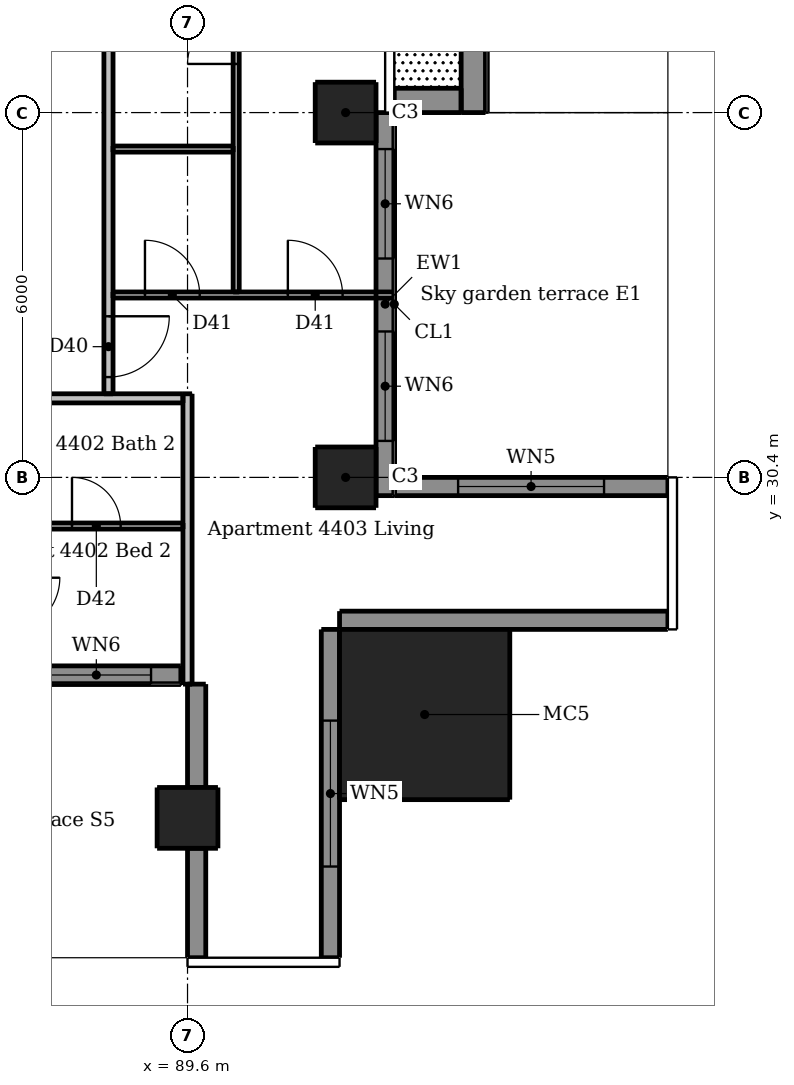
"""IFC4 building model, lengths in metres.
Left out: names, types, materials, properties, quantities, classifications, styles, units other than length and angle.
Written with IfcOpenShell. Run it as: python <this file> out.ifc"""

import sys

from ifc_helpers import new_model, si_unit, direction, frame, frame_2d, origin, origin_2d, place, context, subcontext, project, spatial, rectangle, extrude, element, fill, save


model = new_model("IFC4")
c1 = context("Model", 3, precision=1e-05, world=origin(), true_north=direction((0.0, 1.0)))
c2 = subcontext(c1, "Body", "Model", "MODEL_VIEW")
j1 = project(units=[si_unit("LENGTHUNIT", "METRE"), si_unit("PLANEANGLEUNIT", "RADIAN")], contexts=[c1])
p1 = place(None, origin())
s1 = spatial("IfcSite", under=j1, at=p1, CompositionType="ELEMENT")
p2 = place(p1, origin())
s2 = spatial("IfcBuilding", under=s1, at=p2, CompositionType="ELEMENT")
p3 = place(p2, frame((0.0, 0.0, 164.8)))
s3 = spatial("IfcBuildingStorey", under=s2, at=p3, CompositionType="ELEMENT", Elevation=164.8)
for number, where, z_axis, x_axis in (
    (1, (89.6, 24.8, 0.0), (0.0, 0.0, 1.0), (1.0, 0.0, 0.0)),
    (2, (92.2, 30.4, 0.0), (0.0, 0.0, 1.0), (1.0, 0.0, 0.0)),
    (3, (92.2, 36.4, 0.0), (0.0, 0.0, 1.0), (1.0, 0.0, 0.0)),
):
    element("IfcColumn", number, at=place(p3, frame(where, z_axis=z_axis, x_axis=x_axis)), inside=s3, PredefinedType="COLUMN", context=c2, shape_type="SweptSolid", body=[
        extrude(rectangle(XDim=1.0, YDim=1.0, at=origin_2d()), origin(), (0.0, 0.0, 1.0), 3.05),
    ])
p4 = place(p3, frame((93.5, 26.5, 0.0), z_axis=(0.0, 0.0, 1.0), x_axis=(1.0, 0.0, 0.0)))
e4 = element("IfcColumn", 4, at=p4, inside=s3, PredefinedType="COLUMN", context=c2, shape_type="SweptSolid", body=[
    extrude(rectangle(XDim=2.8, YDim=2.8, at=origin_2d()), origin(), (0.0, 0.0, 1.0), 3.3),
])
p5 = place(p3, frame((89.75, 27.0, 0.0), z_axis=(0.0, 0.0, 1.0), x_axis=(0.0, -1.0, 0.0)))
e5 = element("IfcWall", 5, at=p5, inside=s3, PredefinedType="SOLIDWALL", context=c2, shape_type="SweptSolid", body=[
    extrude(rectangle(XDim=1.7, YDim=0.3, at=frame_2d((0.85, 0.0))), origin(), (0.0, 0.0, 1.0), 3.05),
])
p6 = place(p3, frame((89.75, 24.3, 0.0), z_axis=(0.0, 0.0, 1.0), x_axis=(0.0, -1.0, 0.0)))
e6 = element("IfcWall", 6, at=p6, inside=s3, PredefinedType="SOLIDWALL", context=c2, shape_type="SweptSolid", body=[
    extrude(rectangle(XDim=1.8, YDim=0.3, at=frame_2d((0.9, 0.0))), origin(), (0.0, 0.0, 1.0), 3.05),
])
p7 = place(p3, frame((91.95, 22.5, 0.0), z_axis=(0.0, 0.0, 1.0), x_axis=(0.0, 1.0, 0.0)))
e7 = element("IfcWall", 7, at=p7, inside=s3, PredefinedType="SOLIDWALL", context=c2, shape_type="SweptSolid", body=[
    extrude(rectangle(XDim=5.4, YDim=0.3, at=frame_2d((2.7, 0.0))), origin(), (0.0, 0.0, 1.0), 3.05),
])
p8 = place(p7, frame((1.5, 0.0, 0.15)))
e8 = element("IfcOpeningElement", 8, at=p8, cuts=e7, PredefinedType="OPENING", context=c2, shape_type="SweptSolid", body=[
    extrude(rectangle(XDim=2.4, YDim=2.1, at=frame_2d((1.2, 1.05))), frame((0.0, 0.16, 0.0), z_axis=(0.0, -1.0, 0.0), x_axis=(1.0, 0.0, 0.0)), (0.0, 0.0, 1.0), 0.32),
])
p9 = place(p3, frame((92.1, 28.05, 0.0), z_axis=(0.0, 0.0, 1.0), x_axis=(1.0, 0.0, 0.0)))
e9 = element("IfcWall", 9, at=p9, inside=s3, PredefinedType="SOLIDWALL", context=c2, shape_type="SweptSolid", body=[
    extrude(rectangle(XDim=5.4, YDim=0.3, at=frame_2d((2.7, 0.0))), origin(), (0.0, 0.0, 1.0), 3.05),
])
p10 = place(p3, frame((97.5, 30.25, 0.0), z_axis=(0.0, 0.0, 1.0), x_axis=(-1.0, 0.0, 0.0)))
e10 = element("IfcWall", 10, at=p10, inside=s3, PredefinedType="SOLIDWALL", context=c2, shape_type="SweptSolid", body=[
    extrude(rectangle(XDim=4.5, YDim=0.3, at=frame_2d((2.25, 0.0))), origin(), (0.0, 0.0, 1.0), 3.05),
])
p11 = place(p10, frame((1.05, 0.0, 0.15)))
e11 = element("IfcOpeningElement", 11, at=p11, cuts=e10, PredefinedType="OPENING", context=c2, shape_type="SweptSolid", body=[
    extrude(rectangle(XDim=2.4, YDim=2.1, at=frame_2d((1.2, 1.05))), frame((0.0, 0.16, 0.0), z_axis=(0.0, -1.0, 0.0), x_axis=(1.0, 0.0, 0.0)), (0.0, 0.0, 1.0), 0.32),
])
p12 = place(p3, frame((83.6, 27.15, 0.0), z_axis=(0.0, 0.0, 1.0), x_axis=(1.0, 0.0, 0.0)))
e12 = element("IfcWall", 12, at=p12, inside=s3, PredefinedType="SOLIDWALL", context=c2, shape_type="SweptSolid", body=[
    extrude(rectangle(XDim=5.89, YDim=0.3, at=frame_2d((2.945, 0.0))), origin(), (0.0, 0.0, 1.0), 3.05),
])
p13 = place(p12, frame((0.6, 0.0, 0.15)))
e13 = element("IfcOpeningElement", 13, at=p13, cuts=e12, PredefinedType="OPENING", context=c2, shape_type="SweptSolid", body=[
    extrude(rectangle(XDim=1.8, YDim=2.1, at=frame_2d((0.9, 1.05))), frame((0.0, 0.16, 0.0), z_axis=(0.0, -1.0, 0.0), x_axis=(1.0, 0.0, 0.0)), (0.0, 0.0, 1.0), 0.32),
])
p14 = place(p12, frame((3.6, 0.0, 0.15)))
e14 = element("IfcOpeningElement", 14, at=p14, cuts=e12, PredefinedType="OPENING", context=c2, shape_type="SweptSolid", body=[
    extrude(rectangle(XDim=1.8, YDim=2.1, at=frame_2d((0.9, 1.05))), frame((0.0, 0.16, 0.0), z_axis=(0.0, -1.0, 0.0), x_axis=(1.0, 0.0, 0.0)), (0.0, 0.0, 1.0), 0.32),
])
p15 = place(p3, frame((92.85, 30.1, 0.0), z_axis=(0.0, 0.0, 1.0), x_axis=(0.0, 1.0, 0.0)))
e15 = element("IfcWall", 15, at=p15, inside=s3, PredefinedType="SOLIDWALL", context=c2, shape_type="SweptSolid", body=[
    extrude(rectangle(XDim=6.3, YDim=0.3, at=frame_2d((3.15, 0.0))), origin(), (0.0, 0.0, 1.0), 3.05),
])
p16 = place(p15, frame((0.9, 0.0, 0.15)))
e16 = element("IfcOpeningElement", 16, at=p16, cuts=e15, PredefinedType="OPENING", context=c2, shape_type="SweptSolid", body=[
    extrude(rectangle(XDim=1.8, YDim=2.1, at=frame_2d((0.9, 1.05))), frame((0.0, 0.16, 0.0), z_axis=(0.0, -1.0, 0.0), x_axis=(1.0, 0.0, 0.0)), (0.0, 0.0, 1.0), 0.32),
])
p17 = place(p15, frame((3.9, 0.0, 0.15)))
e17 = element("IfcOpeningElement", 17, at=p17, cuts=e15, PredefinedType="OPENING", context=c2, shape_type="SweptSolid", body=[
    extrude(rectangle(XDim=1.8, YDim=2.1, at=frame_2d((0.9, 1.05))), frame((0.0, 0.16, 0.0), z_axis=(0.0, -1.0, 0.0), x_axis=(1.0, 0.0, 0.0)), (0.0, 0.0, 1.0), 0.32),
])
p18 = place(p3, frame((94.3, 36.4, 0.03), z_axis=(0.0, 0.0, 1.0), x_axis=(0.0, 1.0, 0.0)))
e18 = element("IfcWall", 18, at=p18, inside=s3, PredefinedType="PARAPET", context=c2, shape_type="SweptSolid", body=[
    extrude(rectangle(XDim=6.0, YDim=0.4, at=frame_2d((3.0, 0.0))), origin(), (0.0, 0.0, 1.0), 1.1),
])
p19 = place(p3, frame((93.0, 36.6, 0.03), z_axis=(0.0, 0.0, 1.0), x_axis=(1.0, 0.0, 0.0)))
e19 = element("IfcWall", 19, at=p19, inside=s3, PredefinedType="PARAPET", context=c2, shape_type="SweptSolid", body=[
    extrude(rectangle(XDim=1.1, YDim=0.4, at=frame_2d((0.55, 0.0))), origin(), (0.0, 0.0, 1.0), 1.1),
])
p20 = place(p3, frame((90.4, 33.45, 0.0), z_axis=(0.0, 0.0, 1.0), x_axis=(0.0, 1.0, 0.0)))
e20 = element("IfcWall", 20, at=p20, inside=s3, PredefinedType="PARTITIONING", context=c2, shape_type="SweptSolid", body=[
    extrude(rectangle(XDim=9.0, YDim=0.1, at=frame_2d((4.5, 0.0))), origin(), (0.0, 0.0, 1.0), 3.05),
])
p21 = place(p20, frame((3.75, 0.0, 0.0)))
e21 = element("IfcOpeningElement", 21, at=p21, cuts=e20, PredefinedType="OPENING", context=c2, shape_type="SweptSolid", body=[
    extrude(rectangle(XDim=0.8, YDim=2.1, at=frame_2d((0.4, 1.05))), frame((0.0, 0.06, 0.0), z_axis=(0.0, -1.0, 0.0), x_axis=(1.0, 0.0, 0.0)), (0.0, 0.0, 1.0), 0.12),
])
p22 = place(p20, frame((7.0, 0.0, 0.0)))
e22 = element("IfcOpeningElement", 22, at=p22, cuts=e20, PredefinedType="OPENING", context=c2, shape_type="SweptSolid", body=[
    extrude(rectangle(XDim=0.9, YDim=2.1, at=frame_2d((0.45, 1.05))), frame((0.0, 0.06, 0.0), z_axis=(0.0, -1.0, 0.0), x_axis=(1.0, 0.0, 0.0)), (0.0, 0.0, 1.0), 0.12),
])
p23 = place(p3, frame((88.375, 35.8, 0.0), z_axis=(0.0, 0.0, 1.0), x_axis=(1.0, 0.0, 0.0)))
e23 = element("IfcWall", 23, at=p23, inside=s3, PredefinedType="PARTITIONING", context=c2, shape_type="SweptSolid", body=[
    extrude(rectangle(XDim=1.975, YDim=0.1, at=frame_2d((0.988, 0.0))), origin(), (0.0, 0.0, 1.0), 3.05),
])
p24 = place(p3, frame((88.375, 33.4, 0.0), z_axis=(0.0, 0.0, 1.0), x_axis=(1.0, 0.0, 0.0)))
e24 = element("IfcWall", 24, at=p24, inside=s3, PredefinedType="PARTITIONING", context=c2, shape_type="SweptSolid", body=[
    extrude(rectangle(XDim=4.625, YDim=0.1, at=frame_2d((2.312, 0.0))), origin(), (0.0, 0.0, 1.0), 3.05),
])
p25 = place(p24, frame((0.525, 0.0, 0.0)))
e25 = element("IfcOpeningElement", 25, at=p25, cuts=e24, PredefinedType="OPENING", context=c2, shape_type="SweptSolid", body=[
    extrude(rectangle(XDim=0.9, YDim=2.1, at=frame_2d((0.45, 1.05))), frame((0.0, 0.06, 0.0), z_axis=(0.0, -1.0, 0.0), x_axis=(1.0, 0.0, 0.0)), (0.0, 0.0, 1.0), 0.12),
])
p26 = place(p24, frame((2.875, 0.0, 0.0)))
e26 = element("IfcOpeningElement", 26, at=p26, cuts=e24, PredefinedType="OPENING", context=c2, shape_type="SweptSolid", body=[
    extrude(rectangle(XDim=0.9, YDim=2.1, at=frame_2d((0.45, 1.05))), frame((0.0, 0.06, 0.0), z_axis=(0.0, -1.0, 0.0), x_axis=(1.0, 0.0, 0.0)), (0.0, 0.0, 1.0), 0.12),
])
p27 = place(p3, frame((83.65, 29.6, 0.0), z_axis=(0.0, 0.0, 1.0), x_axis=(1.0, 0.0, 0.0)))
e27 = element("IfcWall", 27, at=p27, inside=s3, PredefinedType="PARTITIONING", context=c2, shape_type="SweptSolid", body=[
    extrude(rectangle(XDim=5.875, YDim=0.1, at=frame_2d((2.938, 0.0))), origin(), (0.0, 0.0, 1.0), 3.05),
])
p28 = place(p27, frame((1.0, 0.0, 0.0)))
e28 = element("IfcOpeningElement", 28, at=p28, cuts=e27, PredefinedType="OPENING", context=c2, shape_type="SweptSolid", body=[
    extrude(rectangle(XDim=0.9, YDim=2.1, at=frame_2d((0.45, 1.05))), frame((0.0, 0.06, 0.0), z_axis=(0.0, -1.0, 0.0), x_axis=(1.0, 0.0, 0.0)), (0.0, 0.0, 1.0), 0.12),
])
p29 = place(p27, frame((4.05, 0.0, 0.0)))
e29 = element("IfcOpeningElement", 29, at=p29, cuts=e27, PredefinedType="OPENING", context=c2, shape_type="SweptSolid", body=[
    extrude(rectangle(XDim=0.8, YDim=2.1, at=frame_2d((0.4, 1.05))), frame((0.0, 0.06, 0.0), z_axis=(0.0, -1.0, 0.0), x_axis=(1.0, 0.0, 0.0)), (0.0, 0.0, 1.0), 0.12),
])
p30 = place(p3, frame((88.3, 61.175, 0.0), z_axis=(0.0, 0.0, 1.0), x_axis=(0.0, -1.0, 0.0)))
e30 = element("IfcWall", 30, at=p30, inside=s3, PredefinedType="PARTITIONING", context=c2, shape_type="SweptSolid", body=[
    extrude(rectangle(XDim=29.4, YDim=0.15, at=frame_2d((14.7, 0.0))), origin(), (0.0, 0.0, 1.0), 3.05),
])
p31 = place(p30, frame((28.125, 0.0, 0.0)))
e31 = element("IfcOpeningElement", 31, at=p31, cuts=e30, PredefinedType="OPENING", context=c2, shape_type="SweptSolid", body=[
    extrude(rectangle(XDim=1.0, YDim=2.1, at=frame_2d((0.5, 1.05))), frame((0.0, 0.085, 0.0), z_axis=(0.0, -1.0, 0.0), x_axis=(1.0, 0.0, 0.0)), (0.0, 0.0, 1.0), 0.17),
])
p32 = place(p30, frame((13.775, 0.0, 0.0)))
e32 = element("IfcOpeningElement", 32, at=p32, cuts=e30, PredefinedType="OPENING", context=c2, shape_type="SweptSolid", body=[
    extrude(rectangle(XDim=1.0, YDim=2.1, at=frame_2d((0.5, 1.05))), frame((0.0, 0.085, 0.0), z_axis=(0.0, -1.0, 0.0), x_axis=(1.0, 0.0, 0.0)), (0.0, 0.0, 1.0), 0.17),
])
p33 = place(p30, frame((3.275, 0.0, 0.0)))
e33 = element("IfcOpeningElement", 33, at=p33, cuts=e30, PredefinedType="OPENING", context=c2, shape_type="SweptSolid", body=[
    extrude(rectangle(XDim=1.0, YDim=2.1, at=frame_2d((0.5, 1.05))), frame((0.0, 0.085, 0.0), z_axis=(0.0, -1.0, 0.0), x_axis=(1.0, 0.0, 0.0)), (0.0, 0.0, 1.0), 0.17),
])
p34 = place(p3, frame((89.6, 27.0, 0.0), z_axis=(0.0, 0.0, 1.0), x_axis=(0.0, 1.0, 0.0)))
e34 = element("IfcWall", 34, at=p34, inside=s3, PredefinedType="PARTITIONING", context=c2, shape_type="SweptSolid", body=[
    extrude(rectangle(XDim=4.775, YDim=0.15, at=frame_2d((2.387, 0.0))), origin(), (0.0, 0.0, 1.0), 2.51),
])
p35 = place(p3, frame((89.525, 31.7, 0.0), z_axis=(0.0, 0.0, 1.0), x_axis=(-1.0, 0.0, 0.0)))
e35 = element("IfcWall", 35, at=p35, inside=s3, PredefinedType="PARTITIONING", context=c2, shape_type="SweptSolid", body=[
    extrude(rectangle(XDim=30.55, YDim=0.15, at=frame_2d((15.275, 0.0))), origin(), (0.0, 0.0, 1.0), 3.05),
])
p36 = place(p35, frame((28.275, 0.0, 0.0)))
e36 = element("IfcOpeningElement", 36, at=p36, cuts=e35, PredefinedType="OPENING", context=c2, shape_type="SweptSolid", body=[
    extrude(rectangle(XDim=1.0, YDim=2.1, at=frame_2d((0.5, 1.05))), frame((0.0, 0.085, 0.0), z_axis=(0.0, -1.0, 0.0), x_axis=(1.0, 0.0, 0.0)), (0.0, 0.0, 1.0), 0.17),
])
p37 = place(p35, frame((9.925, 0.0, 0.0)))
e37 = element("IfcOpeningElement", 37, at=p37, cuts=e35, PredefinedType="OPENING", context=c2, shape_type="SweptSolid", body=[
    extrude(rectangle(XDim=1.0, YDim=2.1, at=frame_2d((0.5, 1.05))), frame((0.0, 0.085, 0.0), z_axis=(0.0, -1.0, 0.0), x_axis=(1.0, 0.0, 0.0)), (0.0, 0.0, 1.0), 0.17),
])
p38 = place(p8, origin())
e38 = element("IfcWindow", 38, at=p38, inside=s3, PartitioningType="DOUBLE_PANEL_VERTICAL", PredefinedType="WINDOW", context=c2, shape_type="SweptSolid", body=[
    extrude(rectangle(XDim=2.4, YDim=2.1, at=frame_2d((1.2, 1.05))), frame((0.0, 0.03, 0.0), z_axis=(0.0, -1.0, 0.0), x_axis=(1.0, 0.0, 0.0)), (0.0, 0.0, 1.0), 0.06),
])
fill(e8, e38)
p39 = place(p11, origin())
e39 = element("IfcWindow", 39, at=p39, inside=s3, PartitioningType="DOUBLE_PANEL_VERTICAL", PredefinedType="WINDOW", context=c2, shape_type="SweptSolid", body=[
    extrude(rectangle(XDim=2.4, YDim=2.1, at=frame_2d((1.2, 1.05))), frame((0.0, 0.03, 0.0), z_axis=(0.0, -1.0, 0.0), x_axis=(1.0, 0.0, 0.0)), (0.0, 0.0, 1.0), 0.06),
])
fill(e11, e39)
p40 = place(p14, origin())
e40 = element("IfcWindow", 40, at=p40, inside=s3, PartitioningType="DOUBLE_PANEL_VERTICAL", PredefinedType="WINDOW", context=c2, shape_type="SweptSolid", body=[
    extrude(rectangle(XDim=1.8, YDim=2.1, at=frame_2d((0.9, 1.05))), frame((0.0, 0.03, 0.0), z_axis=(0.0, -1.0, 0.0), x_axis=(1.0, 0.0, 0.0)), (0.0, 0.0, 1.0), 0.06),
])
fill(e14, e40)
p41 = place(p16, origin())
e41 = element("IfcWindow", 41, at=p41, inside=s3, PartitioningType="DOUBLE_PANEL_VERTICAL", PredefinedType="WINDOW", context=c2, shape_type="SweptSolid", body=[
    extrude(rectangle(XDim=1.8, YDim=2.1, at=frame_2d((0.9, 1.05))), frame((0.0, 0.03, 0.0), z_axis=(0.0, -1.0, 0.0), x_axis=(1.0, 0.0, 0.0)), (0.0, 0.0, 1.0), 0.06),
])
fill(e16, e41)
p42 = place(p17, origin())
e42 = element("IfcWindow", 42, at=p42, inside=s3, PartitioningType="DOUBLE_PANEL_VERTICAL", PredefinedType="WINDOW", context=c2, shape_type="SweptSolid", body=[
    extrude(rectangle(XDim=1.8, YDim=2.1, at=frame_2d((0.9, 1.05))), frame((0.0, 0.03, 0.0), z_axis=(0.0, -1.0, 0.0), x_axis=(1.0, 0.0, 0.0)), (0.0, 0.0, 1.0), 0.06),
])
fill(e17, e42)
p43 = place(p29, origin())
e43 = element("IfcDoor", 43, at=p43, inside=s3, OperationType="SINGLE_SWING_LEFT", PredefinedType="DOOR", context=c2, shape_type="SweptSolid", body=[
    extrude(rectangle(XDim=0.8, YDim=2.1, at=frame_2d((0.4, 1.05))), frame((0.0, 0.025, 0.0), z_axis=(0.0, -1.0, 0.0), x_axis=(1.0, 0.0, 0.0)), (0.0, 0.0, 1.0), 0.05),
])
fill(e29, e43)
p44 = place(p31, origin())
e44 = element("IfcDoor", 44, at=p44, inside=s3, OperationType="SINGLE_SWING_LEFT", PredefinedType="DOOR", context=c2, shape_type="SweptSolid", body=[
    extrude(rectangle(XDim=1.0, YDim=2.1, at=frame_2d((0.5, 1.05))), frame((0.0, 0.025, 0.0), z_axis=(0.0, -1.0, 0.0), x_axis=(1.0, 0.0, 0.0)), (0.0, 0.0, 1.0), 0.05),
])
fill(e31, e44)
p45 = place(p25, origin())
e45 = element("IfcDoor", 45, at=p45, inside=s3, OperationType="SINGLE_SWING_LEFT", PredefinedType="DOOR", context=c2, shape_type="SweptSolid", body=[
    extrude(rectangle(XDim=0.9, YDim=2.1, at=frame_2d((0.45, 1.05))), frame((0.0, 0.025, 0.0), z_axis=(0.0, -1.0, 0.0), x_axis=(1.0, 0.0, 0.0)), (0.0, 0.0, 1.0), 0.05),
])
fill(e25, e45)
p46 = place(p26, origin())
e46 = element("IfcDoor", 46, at=p46, inside=s3, OperationType="SINGLE_SWING_LEFT", PredefinedType="DOOR", context=c2, shape_type="SweptSolid", body=[
    extrude(rectangle(XDim=0.9, YDim=2.1, at=frame_2d((0.45, 1.05))), frame((0.0, 0.025, 0.0), z_axis=(0.0, -1.0, 0.0), x_axis=(1.0, 0.0, 0.0)), (0.0, 0.0, 1.0), 0.05),
])
fill(e26, e46)
p47 = place(p21, origin())
e47 = element("IfcDoor", 47, at=p47, inside=s3, OperationType="SINGLE_SWING_LEFT", PredefinedType="DOOR", context=c2, shape_type="SweptSolid", body=[
    extrude(rectangle(XDim=0.8, YDim=2.1, at=frame_2d((0.4, 1.05))), frame((0.0, 0.025, 0.0), z_axis=(0.0, -1.0, 0.0), x_axis=(1.0, 0.0, 0.0)), (0.0, 0.0, 1.0), 0.05),
])
fill(e21, e47)
save(model, sys.argv[1])
